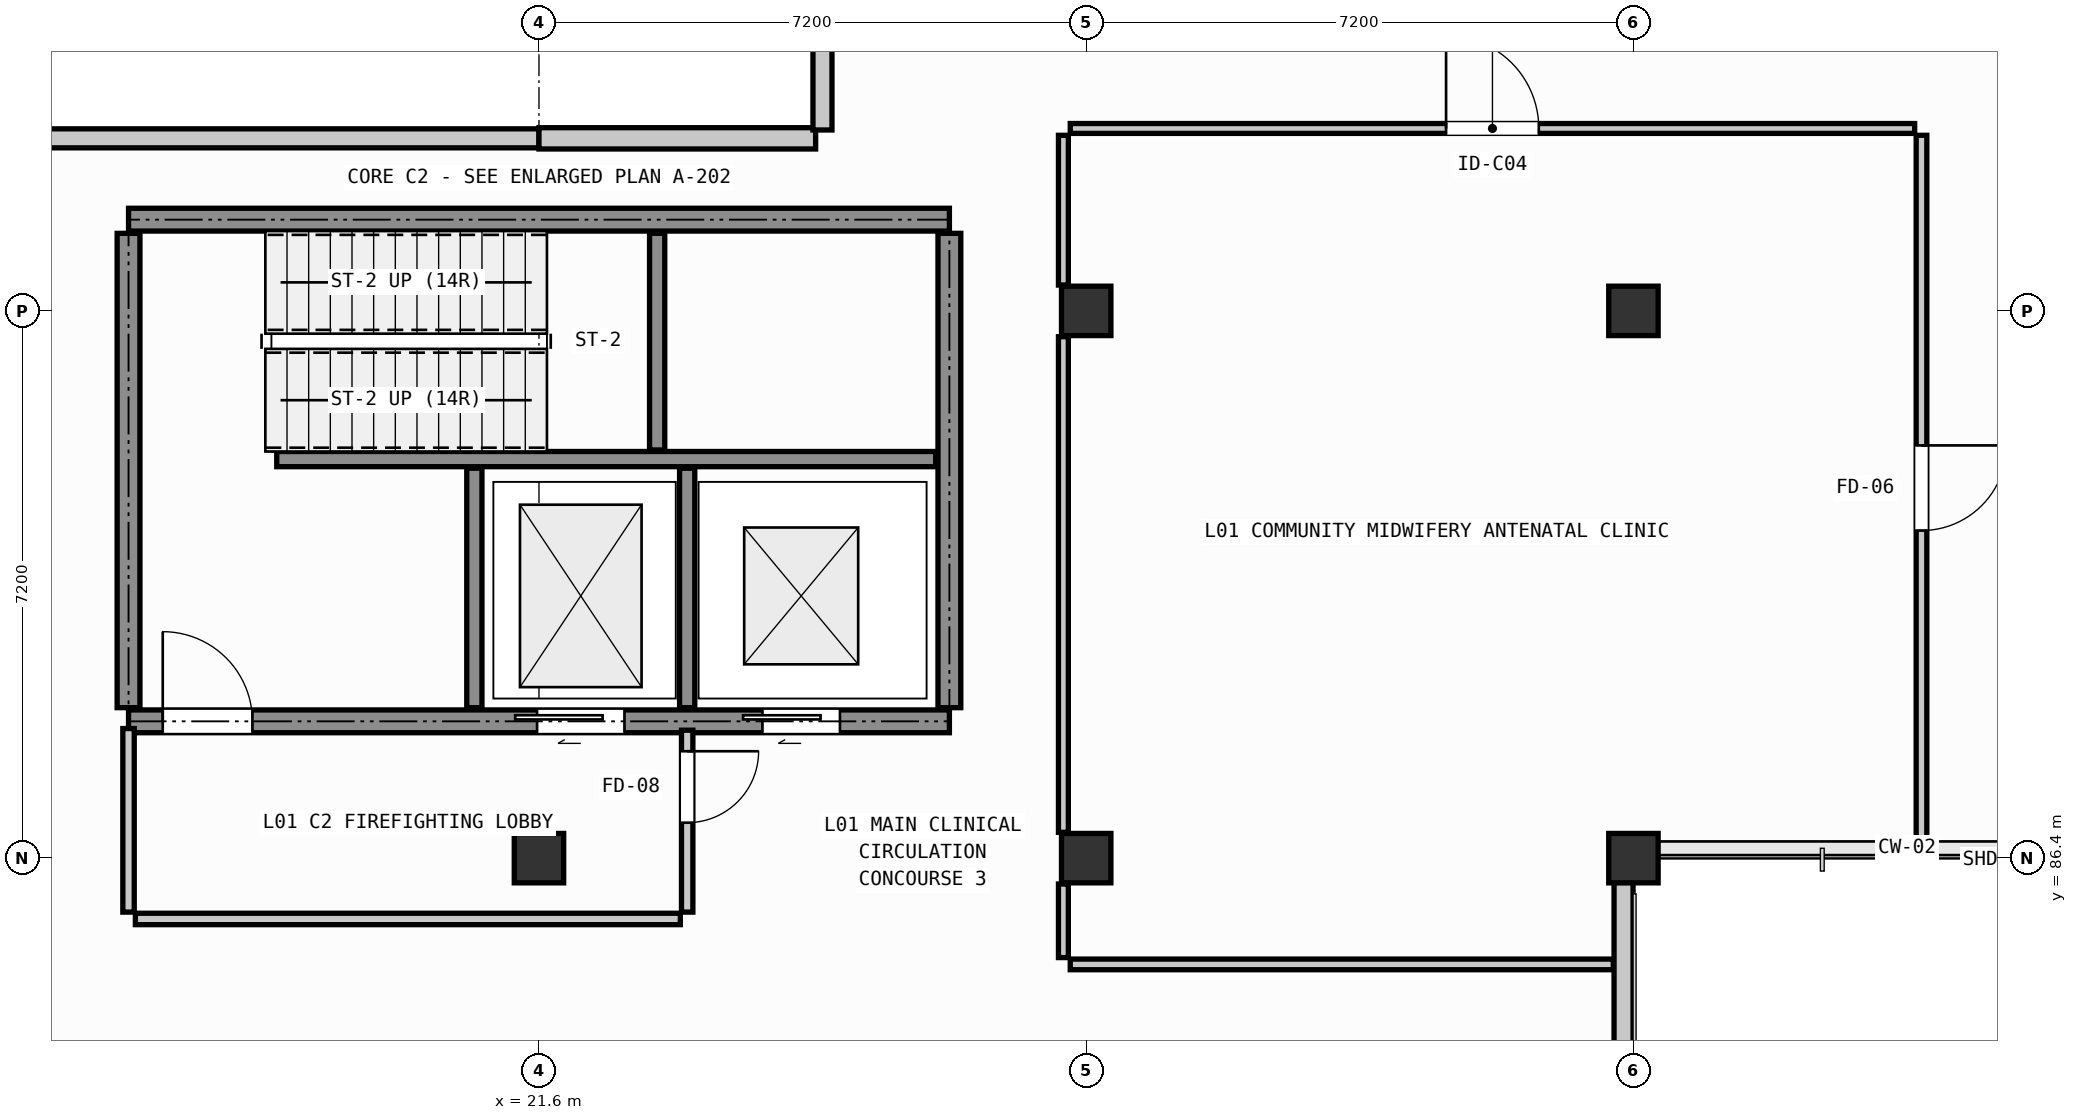
"""IFC4 building model, lengths in metres.
Left out: names, types, materials, properties, quantities, classifications, styles, units other than length and angle.
Written with IfcOpenShell. Run it as: python <this file> out.ifc"""

import sys

from ifc_helpers import new_model, si_unit, direction, frame, frame_2d, origin, origin_2d, place, context, subcontext, project, spatial, rectangle, extrude, element, fill, save


model = new_model("IFC4")
c1 = context("Model", 3, precision=1e-05, world=origin(), true_north=direction((0.0, 1.0)))
c2 = subcontext(c1, "Body", "Model", "MODEL_VIEW")
j1 = project(units=[si_unit("LENGTHUNIT", "METRE"), si_unit("PLANEANGLEUNIT", "RADIAN")], contexts=[c1])
p1 = place(None, origin())
s1 = spatial("IfcSite", under=j1, at=p1, CompositionType="ELEMENT")
p2 = place(p1, origin())
s2 = spatial("IfcBuilding", under=s1, at=p2, CompositionType="ELEMENT")
p3 = place(p2, origin())
s3 = spatial("IfcBuildingStorey", under=s2, at=p3, CompositionType="ELEMENT", Elevation=0.0)
for number, where, z_axis, x_axis in (
    (1, (21.6, 86.4, 0.0), (0.0, 0.0, 1.0), (1.0, 0.0, 0.0)),
    (2, (28.8, 86.4, 0.0), (0.0, 0.0, 1.0), (1.0, 0.0, 0.0)),
    (3, (28.8, 93.6, 0.0), (0.0, 0.0, 1.0), (1.0, 0.0, 0.0)),
):
    element("IfcColumn", number, at=place(p3, frame(where, z_axis=z_axis, x_axis=x_axis)), inside=s3, PredefinedType="COLUMN", context=c2, shape_type="SweptSolid", body=[
        extrude(rectangle(XDim=0.65, YDim=0.65, at=origin_2d()), origin(), (0.0, 0.0, 1.0), 4.56),
    ])
for number, where, z_axis, x_axis in (
    (4, (36.0, 86.4, -0.25), (0.0, 0.0, 1.0), (1.0, 0.0, 0.0)),
    (5, (36.0, 93.6, -0.25), (0.0, 0.0, 1.0), (1.0, 0.0, 0.0)),
):
    element("IfcColumn", number, at=place(p3, frame(where, z_axis=z_axis, x_axis=x_axis)), inside=s3, PredefinedType="COLUMN", context=c2, shape_type="SweptSolid", body=[
        extrude(rectangle(XDim=0.65, YDim=0.65, at=origin_2d()), origin(), (0.0, 0.0, 1.0), 4.81),
    ])
p4 = place(p3, frame((35.87, 86.08, 0.0), z_axis=(0.0, 0.0, 1.0), x_axis=(0.0, -1.0, 0.0)))
e6 = element("IfcWall", 6, at=p4, inside=s3, PredefinedType="SOLIDWALL", context=c2, shape_type="SweptSolid", body=[
    extrude(rectangle(XDim=6.56, YDim=0.25, at=frame_2d((3.28, 0.0))), origin(), (0.0, 0.0, 1.0), 3.76),
])
p5 = place(p4, frame((2.355, 0.0, 1.5)))
e7 = element("IfcOpeningElement", 7, at=p5, cuts=e6, PredefinedType="OPENING", context=c2, shape_type="SweptSolid", body=[
    extrude(rectangle(XDim=0.75, YDim=0.95, at=frame_2d((0.375, 0.475))), frame((0.0, 0.135, 0.0), z_axis=(0.0, -1.0, 0.0), x_axis=(1.0, 0.0, 0.0)), (0.0, 0.0, 1.0), 0.27),
])
p6 = place(p3, frame((14.36, 95.87, 0.0), z_axis=(0.0, 0.0, 1.0), x_axis=(1.0, 0.0, 0.0)))
e8 = element("IfcWall", 8, at=p6, inside=s3, PredefinedType="SOLIDWALL", context=c2, shape_type="SweptSolid", body=[
    extrude(rectangle(XDim=7.24, YDim=0.25, at=frame_2d((3.62, 0.0))), origin(), (0.0, 0.0, 1.0), 3.86),
])
p7 = place(p3, frame((21.6, 95.87, 0.0), z_axis=(0.0, 0.0, 1.0), x_axis=(1.0, 0.0, 0.0)))
e9 = element("IfcWall", 9, at=p7, inside=s3, PredefinedType="SOLIDWALL", context=c2, shape_type="SweptSolid", body=[
    extrude(rectangle(XDim=3.64, YDim=0.28, at=frame_2d((1.82, 0.0))), origin(), (0.0, 0.0, 1.0), 4.57),
])
p8 = place(p3, frame((25.33, 95.98, 0.0), z_axis=(0.0, 0.0, 1.0), x_axis=(0.0, 1.0, 0.0)))
e10 = element("IfcWall", 10, at=p8, inside=s3, PredefinedType="SOLIDWALL", context=c2, shape_type="SweptSolid", body=[
    extrude(rectangle(XDim=4.82, YDim=0.25, at=frame_2d((2.41, 0.0))), origin(), (0.0, 0.0, 1.0), 4.57),
])
p9 = place(p8, frame((1.585, 0.0, 0.95)))
e11 = element("IfcOpeningElement", 11, at=p9, cuts=e10, PredefinedType="OPENING", context=c2, shape_type="SweptSolid", body=[
    extrude(rectangle(XDim=1.65, YDim=1.85, at=frame_2d((0.825, 0.925))), frame((0.0, 0.135, 0.0), z_axis=(0.0, -1.0, 0.0), x_axis=(1.0, 0.0, 0.0)), (0.0, 0.0, 1.0), 0.27),
])
p10 = place(p3, frame((16.2, 88.2, 0.0), z_axis=(0.0, 0.0, 1.0), x_axis=(1.0, 0.0, 0.0)))
e12 = element("IfcWall", 12, at=p10, inside=s3, PredefinedType="SHEAR", context=c2, shape_type="SweptSolid", body=[
    extrude(rectangle(XDim=10.8, YDim=0.3, at=frame_2d((5.4, 0.0))), origin(), (0.0, 0.0, 1.0), 4.8),
])
p11 = place(p10, frame((0.45, 0.0, 0.0)))
e13 = element("IfcOpeningElement", 13, at=p11, cuts=e12, PredefinedType="OPENING", context=c2, shape_type="SweptSolid", body=[
    extrude(rectangle(XDim=1.18, YDim=2.16, at=frame_2d((0.59, 1.08))), frame((0.0, 0.16, 0.0), z_axis=(0.0, -1.0, 0.0), x_axis=(1.0, 0.0, 0.0)), (0.0, 0.0, 1.0), 0.32),
])
p12 = place(p10, frame((5.375, 0.0, 0.0)))
e14 = element("IfcOpeningElement", 14, at=p12, cuts=e12, PredefinedType="OPENING", context=c2, shape_type="SweptSolid", body=[
    extrude(rectangle(XDim=1.15, YDim=2.15, at=frame_2d((0.575, 1.075))), frame((0.0, 0.16, 0.0), z_axis=(0.0, -1.0, 0.0), x_axis=(1.0, 0.0, 0.0)), (0.0, 0.0, 1.0), 0.32),
])
p13 = place(p10, frame((8.34, 0.0, 0.0)))
e15 = element("IfcOpeningElement", 15, at=p13, cuts=e12, PredefinedType="OPENING", context=c2, shape_type="SweptSolid", body=[
    extrude(rectangle(XDim=1.02, YDim=2.12, at=frame_2d((0.51, 1.06))), frame((0.0, 0.16, 0.0), z_axis=(0.0, -1.0, 0.0), x_axis=(1.0, 0.0, 0.0)), (0.0, 0.0, 1.0), 0.32),
])
p14 = place(p3, frame((16.2, 94.8, 0.0), z_axis=(0.0, 0.0, 1.0), x_axis=(1.0, 0.0, 0.0)))
e16 = element("IfcWall", 16, at=p14, inside=s3, PredefinedType="SHEAR", context=c2, shape_type="SweptSolid", body=[
    extrude(rectangle(XDim=10.8, YDim=0.3, at=frame_2d((5.4, 0.0))), origin(), (0.0, 0.0, 1.0), 4.8),
])
for number, where, z_axis, x_axis in (
    (17, (16.2, 88.38, 0.0), (0.0, 0.0, 1.0), (0.0, 1.0, 0.0)),
    (18, (27.0, 88.38, 0.0), (0.0, 0.0, 1.0), (0.0, 1.0, 0.0)),
):
    element("IfcWall", number, at=place(p3, frame(where, z_axis=z_axis, x_axis=x_axis)), inside=s3, PredefinedType="SHEAR", context=c2, shape_type="SweptSolid", body=[
        extrude(rectangle(XDim=6.24, YDim=0.3, at=frame_2d((3.12, 0.0))), origin(), (0.0, 0.0, 1.0), 4.8),
    ])
p15 = place(p3, frame((18.15, 91.65, 0.0), z_axis=(0.0, 0.0, 1.0), x_axis=(1.0, 0.0, 0.0)))
e19 = element("IfcWall", 19, at=p15, inside=s3, PredefinedType="SHEAR", context=c2, shape_type="SweptSolid", body=[
    extrude(rectangle(XDim=8.67, YDim=0.2, at=frame_2d((4.335, 0.0))), origin(), (0.0, 0.0, 1.0), 4.8),
])
p16 = place(p3, frame((23.155, 91.77, 0.0), z_axis=(0.0, 0.0, 1.0), x_axis=(0.0, 1.0, 0.0)))
e20 = element("IfcWall", 20, at=p16, inside=s3, PredefinedType="SHEAR", context=c2, shape_type="SweptSolid", body=[
    extrude(rectangle(XDim=2.85, YDim=0.2, at=frame_2d((1.425, 0.0))), origin(), (0.0, 0.0, 1.0), 4.8),
])
for number, where, z_axis, x_axis in (
    (21, (20.75, 88.38, 0.0), (0.0, 0.0, 1.0), (0.0, 1.0, 0.0)),
    (22, (23.55, 88.38, 0.0), (0.0, 0.0, 1.0), (0.0, 1.0, 0.0)),
):
    element("IfcWall", number, at=place(p3, frame(where, z_axis=z_axis, x_axis=x_axis)), inside=s3, PredefinedType="SHEAR", context=c2, shape_type="SweptSolid", body=[
        extrude(rectangle(XDim=3.15, YDim=0.2, at=frame_2d((1.575, 0.0))), origin(), (0.0, 0.0, 1.0), 4.8),
    ])
p17 = place(p3, frame((16.2, 85.69, 0.0), z_axis=(0.0, 0.0, 1.0), x_axis=(0.0, 1.0, 0.0)))
e23 = element("IfcWall", 23, at=p17, inside=s3, PredefinedType="PARTITIONING", context=c2, shape_type="SweptSolid", body=[
    extrude(rectangle(XDim=2.415, YDim=0.15, at=frame_2d((1.208, 0.0))), origin(), (0.0, 0.0, 1.0), 3.76),
])
p18 = place(p3, frame((23.55, 88.083, 0.0), z_axis=(0.0, 0.0, 1.0), x_axis=(0.0, -1.0, 0.0)))
e24 = element("IfcWall", 24, at=p18, inside=s3, PredefinedType="PARTITIONING", context=c2, shape_type="SweptSolid", body=[
    extrude(rectangle(XDim=2.393, YDim=0.15, at=frame_2d((1.197, 0.0))), origin(), (0.0, 0.0, 1.0), 3.76),
])
p19 = place(p18, frame((0.277, 0.0, 0.0)))
e25 = element("IfcOpeningElement", 25, at=p19, cuts=e24, PredefinedType="OPENING", context=c2, shape_type="SweptSolid", body=[
    extrude(rectangle(XDim=0.94, YDim=2.1, at=frame_2d((0.47, 1.05))), frame((0.0, 0.085, 0.0), z_axis=(0.0, -1.0, 0.0), x_axis=(1.0, 0.0, 0.0)), (0.0, 0.0, 1.0), 0.17),
])
p20 = place(p3, frame((23.46, 85.6, 0.0), z_axis=(0.0, 0.0, 1.0), x_axis=(-1.0, 0.0, 0.0)))
e26 = element("IfcWall", 26, at=p20, inside=s3, PredefinedType="PARTITIONING", context=c2, shape_type="SweptSolid", body=[
    extrude(rectangle(XDim=7.17, YDim=0.15, at=frame_2d((3.585, 0.0))), origin(), (0.0, 0.0, 1.0), 3.86),
])
p21 = place(p3, frame((28.59, 96.0, 0.0), z_axis=(0.0, 0.0, 1.0), x_axis=(1.0, 0.0, 0.0)))
e27 = element("IfcWall", 27, at=p21, inside=s3, PredefinedType="PARTITIONING", context=c2, shape_type="SweptSolid", body=[
    extrude(rectangle(XDim=11.11, YDim=0.13, at=frame_2d((5.555, 0.0))), origin(), (0.0, 0.0, 1.0), 3.86),
])
p22 = place(p21, frame((4.945, 0.0, 0.0)))
e28 = element("IfcOpeningElement", 28, at=p22, cuts=e27, PredefinedType="OPENING", context=c2, shape_type="SweptSolid", body=[
    extrude(rectangle(XDim=1.22, YDim=2.18, at=frame_2d((0.61, 1.09))), frame((0.0, 0.075, 0.0), z_axis=(0.0, -1.0, 0.0), x_axis=(1.0, 0.0, 0.0)), (0.0, 0.0, 1.0), 0.15),
])
p23 = place(p3, frame((39.79, 95.91, 0.0), z_axis=(0.0, 0.0, 1.0), x_axis=(0.0, -1.0, 0.0)))
e29 = element("IfcWall", 29, at=p23, inside=s3, PredefinedType="PARTITIONING", context=c2, shape_type="SweptSolid", body=[
    extrude(rectangle(XDim=9.28, YDim=0.14, at=frame_2d((4.64, 0.0))), origin(), (0.0, 0.0, 1.0), 3.76),
])
p24 = place(p23, frame((4.08, 0.0, 0.0)))
e30 = element("IfcOpeningElement", 30, at=p24, cuts=e29, PredefinedType="OPENING", context=c2, shape_type="SweptSolid", body=[
    extrude(rectangle(XDim=1.12, YDim=2.14, at=frame_2d((0.56, 1.07))), frame((0.0, 0.08, 0.0), z_axis=(0.0, -1.0, 0.0), x_axis=(1.0, 0.0, 0.0)), (0.0, 0.0, 1.0), 0.16),
])
p25 = place(p3, frame((35.735, 85.002, 0.0), z_axis=(0.0, 0.0, 1.0), x_axis=(-1.0, 0.0, 0.0)))
e31 = element("IfcWall", 31, at=p25, inside=s3, PredefinedType="PARTITIONING", context=c2, shape_type="SweptSolid", body=[
    extrude(rectangle(XDim=7.145, YDim=0.14, at=frame_2d((3.573, 0.0))), origin(), (0.0, 0.0, 1.0), 3.86),
])
p26 = place(p3, frame((28.5, 85.092, 0.0), z_axis=(0.0, 0.0, 1.0), x_axis=(0.0, 1.0, 0.0)))
e32 = element("IfcWall", 32, at=p26, inside=s3, PredefinedType="PARTITIONING", context=c2, shape_type="SweptSolid", body=[
    extrude(rectangle(XDim=0.968, YDim=0.13, at=frame_2d((0.484, 0.0))), origin(), (0.0, 0.0, 1.0), 3.76),
])
p27 = place(p3, frame((28.5, 86.74, 0.0), z_axis=(0.0, 0.0, 1.0), x_axis=(0.0, 1.0, 0.0)))
e33 = element("IfcWall", 33, at=p27, inside=s3, PredefinedType="PARTITIONING", context=c2, shape_type="SweptSolid", body=[
    extrude(rectangle(XDim=6.52, YDim=0.13, at=frame_2d((3.26, 0.0))), origin(), (0.0, 0.0, 1.0), 3.76),
])
p28 = place(p3, frame((28.5, 93.94, 0.0), z_axis=(0.0, 0.0, 1.0), x_axis=(0.0, 1.0, 0.0)))
e34 = element("IfcWall", 34, at=p28, inside=s3, PredefinedType="PARTITIONING", context=c2, shape_type="SweptSolid", body=[
    extrude(rectangle(XDim=1.97, YDim=0.13, at=frame_2d((0.985, 0.0))), origin(), (0.0, 0.0, 1.0), 3.86),
])
p29 = place(p11, origin())
e35 = element("IfcDoor", 35, at=p29, inside=s3, OperationType="SINGLE_SWING_LEFT", PredefinedType="DOOR", context=c2, shape_type="SweptSolid", body=[
    extrude(rectangle(XDim=1.18, YDim=2.16, at=frame_2d((0.59, 1.08))), frame((0.0, 0.025, 0.0), z_axis=(0.0, -1.0, 0.0), x_axis=(1.0, 0.0, 0.0)), (0.0, 0.0, 1.0), 0.05),
])
fill(e13, e35)
p30 = place(p12, origin())
e36 = element("IfcDoor", 36, at=p30, inside=s3, OperationType="DOUBLE_DOOR_SLIDING", PredefinedType="DOOR", context=c2, shape_type="SweptSolid", body=[
    extrude(rectangle(XDim=1.15, YDim=2.15, at=frame_2d((0.575, 1.075))), frame((0.0, 0.025, 0.0), z_axis=(0.0, -1.0, 0.0), x_axis=(1.0, 0.0, 0.0)), (0.0, 0.0, 1.0), 0.05),
])
fill(e14, e36)
p31 = place(p13, origin())
e37 = element("IfcDoor", 37, at=p31, inside=s3, OperationType="SLIDING_TO_LEFT", PredefinedType="DOOR", context=c2, shape_type="SweptSolid", body=[
    extrude(rectangle(XDim=1.02, YDim=2.12, at=frame_2d((0.51, 1.06))), frame((0.0, 0.025, 0.0), z_axis=(0.0, -1.0, 0.0), x_axis=(1.0, 0.0, 0.0)), (0.0, 0.0, 1.0), 0.05),
])
fill(e15, e37)
p32 = place(p19, origin())
e38 = element("IfcDoor", 38, at=p32, inside=s3, OperationType="SINGLE_SWING_LEFT", PredefinedType="DOOR", context=c2, shape_type="SweptSolid", body=[
    extrude(rectangle(XDim=0.94, YDim=2.1, at=frame_2d((0.47, 1.05))), frame((0.0, 0.025, 0.0), z_axis=(0.0, -1.0, 0.0), x_axis=(1.0, 0.0, 0.0)), (0.0, 0.0, 1.0), 0.05),
])
fill(e25, e38)
p33 = place(p24, origin())
e39 = element("IfcDoor", 39, at=p33, inside=s3, OperationType="SINGLE_SWING_RIGHT", PredefinedType="DOOR", context=c2, shape_type="SweptSolid", body=[
    extrude(rectangle(XDim=1.12, YDim=2.14, at=frame_2d((0.56, 1.07))), frame((0.0, 0.025, 0.0), z_axis=(0.0, -1.0, 0.0), x_axis=(1.0, 0.0, 0.0)), (0.0, 0.0, 1.0), 0.05),
])
fill(e30, e39)
p34 = place(p22, origin())
e40 = element("IfcDoor", 40, at=p34, inside=s3, OperationType="SINGLE_SWING_LEFT", PredefinedType="DOOR", context=c2, shape_type="SweptSolid", body=[
    extrude(rectangle(XDim=1.22, YDim=2.18, at=frame_2d((0.61, 1.09))), frame((0.0, 0.025, 0.0), z_axis=(0.0, -1.0, 0.0), x_axis=(1.0, 0.0, 0.0)), (0.0, 0.0, 1.0), 0.05),
])
fill(e28, e40)
save(model, sys.argv[1])
